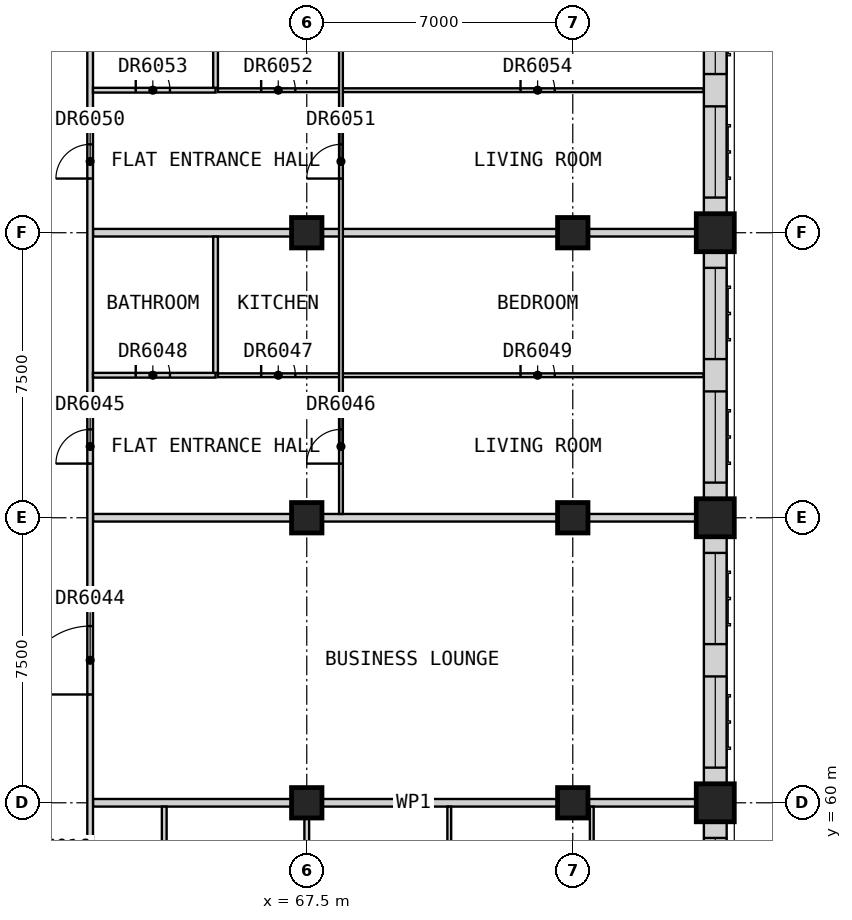
"""IFC4 building model, lengths in metres.
Left out: names, types, materials, properties, quantities, classifications, styles, units other than length and angle.
Written with IfcOpenShell. Run it as: python <this file> out.ifc"""

import sys

from ifc_helpers import new_model, si_unit, direction, frame, frame_2d, origin, origin_2d, place, context, subcontext, project, spatial, rectangle, extrude, element, fill, save


model = new_model("IFC4")
c1 = context("Model", 3, precision=1e-05, world=origin(), true_north=direction((0.0, 1.0)))
c2 = subcontext(c1, "Body", "Model", "MODEL_VIEW")
j1 = project(units=[si_unit("LENGTHUNIT", "METRE"), si_unit("PLANEANGLEUNIT", "RADIAN")], contexts=[c1])
p1 = place(None, origin())
s1 = spatial("IfcSite", under=j1, at=p1, CompositionType="ELEMENT")
p2 = place(p1, origin())
s2 = spatial("IfcBuilding", under=s1, at=p2, CompositionType="ELEMENT")
p3 = place(p2, frame((0.0, 0.0, 226.7)))
s3 = spatial("IfcBuildingStorey", under=s2, at=p3, CompositionType="ELEMENT", Elevation=226.7)
for number, where, z_axis, x_axis in (
    (1, (78.25, 60.0, 0.0), (0.0, 0.0, 1.0), (1.0, 0.0, 0.0)),
    (2, (78.25, 67.5, 0.0), (0.0, 0.0, 1.0), (1.0, 0.0, 0.0)),
    (3, (78.25, 75.0, 0.0), (0.0, 0.0, 1.0), (1.0, 0.0, 0.0)),
):
    element("IfcColumn", number, at=place(p3, frame(where, z_axis=z_axis, x_axis=x_axis)), inside=s3, PredefinedType="COLUMN", context=c2, shape_type="SweptSolid", body=[
        extrude(rectangle(XDim=1.0, YDim=1.0, at=origin_2d()), origin(), (0.0, 0.0, 1.0), 3.5),
    ])
for number, where, z_axis, x_axis in (
    (4, (67.5, 60.0, 0.0), (0.0, 0.0, 1.0), (1.0, 0.0, 0.0)),
    (5, (67.5, 67.5, 0.0), (0.0, 0.0, 1.0), (1.0, 0.0, 0.0)),
    (6, (67.5, 75.0, 0.0), (0.0, 0.0, 1.0), (1.0, 0.0, 0.0)),
    (7, (74.5, 60.0, 0.0), (0.0, 0.0, 1.0), (1.0, 0.0, 0.0)),
    (8, (74.5, 67.5, 0.0), (0.0, 0.0, 1.0), (1.0, 0.0, 0.0)),
    (9, (74.5, 75.0, 0.0), (0.0, 0.0, 1.0), (1.0, 0.0, 0.0)),
):
    element("IfcColumn", number, at=place(p3, frame(where, z_axis=z_axis, x_axis=x_axis)), inside=s3, PredefinedType="COLUMN", context=c2, shape_type="SweptSolid", body=[
        extrude(rectangle(XDim=0.8, YDim=0.8, at=origin_2d()), origin(), (0.0, 0.0, 1.0), 3.5),
    ])
p4 = place(p3, frame((78.25, 53.0, 0.0), z_axis=(0.0, 0.0, 1.0), x_axis=(0.0, 1.0, 0.0)))
e10 = element("IfcWall", 10, at=p4, inside=s3, PredefinedType="SOLIDWALL", context=c2, shape_type="SweptSolid", body=[
    extrude(rectangle(XDim=6.5, YDim=0.6, at=frame_2d((3.25, 0.0))), origin(), (0.0, 0.0, 1.0), 2.75),
])
p5 = place(p4, frame((0.425, 0.0, 0.8)))
e11 = element("IfcOpeningElement", 11, at=p5, cuts=e10, PredefinedType="OPENING", context=c2, shape_type="SweptSolid", body=[
    extrude(rectangle(XDim=2.4, YDim=1.8, at=frame_2d((1.2, 0.9))), frame((0.0, 0.31, 0.0), z_axis=(0.0, -1.0, 0.0), x_axis=(1.0, 0.0, 0.0)), (0.0, 0.0, 1.0), 0.62),
])
p6 = place(p4, frame((3.675, 0.0, 0.8)))
e12 = element("IfcOpeningElement", 12, at=p6, cuts=e10, PredefinedType="OPENING", context=c2, shape_type="SweptSolid", body=[
    extrude(rectangle(XDim=2.4, YDim=1.8, at=frame_2d((1.2, 0.9))), frame((0.0, 0.31, 0.0), z_axis=(0.0, -1.0, 0.0), x_axis=(1.0, 0.0, 0.0)), (0.0, 0.0, 1.0), 0.62),
])
p7 = place(p3, frame((78.25, 60.5, 0.0), z_axis=(0.0, 0.0, 1.0), x_axis=(0.0, 1.0, 0.0)))
e13 = element("IfcWall", 13, at=p7, inside=s3, PredefinedType="SOLIDWALL", context=c2, shape_type="SweptSolid", body=[
    extrude(rectangle(XDim=6.5, YDim=0.6, at=frame_2d((3.25, 0.0))), origin(), (0.0, 0.0, 1.0), 2.75),
])
p8 = place(p7, frame((0.425, 0.0, 0.8)))
e14 = element("IfcOpeningElement", 14, at=p8, cuts=e13, PredefinedType="OPENING", context=c2, shape_type="SweptSolid", body=[
    extrude(rectangle(XDim=2.4, YDim=1.8, at=frame_2d((1.2, 0.9))), frame((0.0, 0.31, 0.0), z_axis=(0.0, -1.0, 0.0), x_axis=(1.0, 0.0, 0.0)), (0.0, 0.0, 1.0), 0.62),
])
p9 = place(p7, frame((3.675, 0.0, 0.8)))
e15 = element("IfcOpeningElement", 15, at=p9, cuts=e13, PredefinedType="OPENING", context=c2, shape_type="SweptSolid", body=[
    extrude(rectangle(XDim=2.4, YDim=1.8, at=frame_2d((1.2, 0.9))), frame((0.0, 0.31, 0.0), z_axis=(0.0, -1.0, 0.0), x_axis=(1.0, 0.0, 0.0)), (0.0, 0.0, 1.0), 0.62),
])
p10 = place(p3, frame((78.25, 68.0, 0.0), z_axis=(0.0, 0.0, 1.0), x_axis=(0.0, 1.0, 0.0)))
e16 = element("IfcWall", 16, at=p10, inside=s3, PredefinedType="SOLIDWALL", context=c2, shape_type="SweptSolid", body=[
    extrude(rectangle(XDim=6.5, YDim=0.6, at=frame_2d((3.25, 0.0))), origin(), (0.0, 0.0, 1.0), 2.75),
])
p11 = place(p10, frame((0.425, 0.0, 0.8)))
e17 = element("IfcOpeningElement", 17, at=p11, cuts=e16, PredefinedType="OPENING", context=c2, shape_type="SweptSolid", body=[
    extrude(rectangle(XDim=2.4, YDim=1.8, at=frame_2d((1.2, 0.9))), frame((0.0, 0.31, 0.0), z_axis=(0.0, -1.0, 0.0), x_axis=(1.0, 0.0, 0.0)), (0.0, 0.0, 1.0), 0.62),
])
p12 = place(p10, frame((3.675, 0.0, 0.8)))
e18 = element("IfcOpeningElement", 18, at=p12, cuts=e16, PredefinedType="OPENING", context=c2, shape_type="SweptSolid", body=[
    extrude(rectangle(XDim=2.4, YDim=1.8, at=frame_2d((1.2, 0.9))), frame((0.0, 0.31, 0.0), z_axis=(0.0, -1.0, 0.0), x_axis=(1.0, 0.0, 0.0)), (0.0, 0.0, 1.0), 0.62),
])
p13 = place(p3, frame((78.25, 75.5, 0.0), z_axis=(0.0, 0.0, 1.0), x_axis=(0.0, 1.0, 0.0)))
e19 = element("IfcWall", 19, at=p13, inside=s3, PredefinedType="SOLIDWALL", context=c2, shape_type="SweptSolid", body=[
    extrude(rectangle(XDim=6.5, YDim=0.6, at=frame_2d((3.25, 0.0))), origin(), (0.0, 0.0, 1.0), 2.75),
])
p14 = place(p13, frame((0.425, 0.0, 0.8)))
e20 = element("IfcOpeningElement", 20, at=p14, cuts=e19, PredefinedType="OPENING", context=c2, shape_type="SweptSolid", body=[
    extrude(rectangle(XDim=2.4, YDim=1.8, at=frame_2d((1.2, 0.9))), frame((0.0, 0.31, 0.0), z_axis=(0.0, -1.0, 0.0), x_axis=(1.0, 0.0, 0.0)), (0.0, 0.0, 1.0), 0.62),
])
p15 = place(p13, frame((3.675, 0.0, 0.8)))
e21 = element("IfcOpeningElement", 21, at=p15, cuts=e19, PredefinedType="OPENING", context=c2, shape_type="SweptSolid", body=[
    extrude(rectangle(XDim=2.4, YDim=1.8, at=frame_2d((1.2, 0.9))), frame((0.0, 0.31, 0.0), z_axis=(0.0, -1.0, 0.0), x_axis=(1.0, 0.0, 0.0)), (0.0, 0.0, 1.0), 0.62),
])
for number, where, z_axis, x_axis in (
    (22, (61.875, 60.0, 0.0), (0.0, 0.0, 1.0), (1.0, 0.0, 0.0)),
    (23, (61.875, 67.5, 0.0), (0.0, 0.0, 1.0), (1.0, 0.0, 0.0)),
    (24, (61.875, 75.0, 0.0), (0.0, 0.0, 1.0), (1.0, 0.0, 0.0)),
):
    element("IfcWall", number, at=place(p3, frame(where, z_axis=z_axis, x_axis=x_axis)), inside=s3, PredefinedType="PARTITIONING", context=c2, shape_type="SweptSolid", body=[
        extrude(rectangle(XDim=16.875, YDim=0.2, at=frame_2d((8.438, 0.0))), origin(), (0.0, 0.0, 1.0), 3.25),
    ])
p16 = place(p3, frame((61.8, 58.275, 0.0), z_axis=(0.0, 0.0, 1.0), x_axis=(0.0, 1.0, 0.0)))
e25 = element("IfcWall", 25, at=p16, inside=s3, PredefinedType="PARTITIONING", context=c2, shape_type="SweptSolid", body=[
    extrude(rectangle(XDim=25.95, YDim=0.15, at=frame_2d((12.975, 0.0))), origin(), (0.0, 0.0, 1.0), 3.25),
])
p17 = place(p16, frame((4.575, 0.0, 0.0)))
e26 = element("IfcOpeningElement", 26, at=p17, cuts=e25, PredefinedType="OPENING", context=c2, shape_type="SweptSolid", body=[
    extrude(rectangle(XDim=1.8, YDim=2.1, at=frame_2d((0.9, 1.05))), frame((0.0, 0.085, 0.0), z_axis=(0.0, -1.0, 0.0), x_axis=(1.0, 0.0, 0.0)), (0.0, 0.0, 1.0), 0.17),
])
p18 = place(p16, frame((10.65, 0.0, 0.0)))
e27 = element("IfcOpeningElement", 27, at=p18, cuts=e25, PredefinedType="OPENING", context=c2, shape_type="SweptSolid", body=[
    extrude(rectangle(XDim=0.9, YDim=2.1, at=frame_2d((0.45, 1.05))), frame((0.0, 0.085, 0.0), z_axis=(0.0, -1.0, 0.0), x_axis=(1.0, 0.0, 0.0)), (0.0, 0.0, 1.0), 0.17),
])
p19 = place(p16, frame((18.15, 0.0, 0.0)))
e28 = element("IfcOpeningElement", 28, at=p19, cuts=e25, PredefinedType="OPENING", context=c2, shape_type="SweptSolid", body=[
    extrude(rectangle(XDim=0.9, YDim=2.1, at=frame_2d((0.45, 1.05))), frame((0.0, 0.085, 0.0), z_axis=(0.0, -1.0, 0.0), x_axis=(1.0, 0.0, 0.0)), (0.0, 0.0, 1.0), 0.17),
])
p20 = place(p3, frame((65.163, 71.25, 0.0), z_axis=(0.0, 0.0, 1.0), x_axis=(1.0, 0.0, 0.0)))
e29 = element("IfcWall", 29, at=p20, inside=s3, PredefinedType="PARTITIONING", context=c2, shape_type="SweptSolid", body=[
    extrude(rectangle(XDim=12.777, YDim=0.1, at=frame_2d((6.389, 0.0))), origin(), (0.0, 0.0, 1.0), 3.25),
])
p21 = place(p20, frame((1.137, 0.0, 0.0)))
e30 = element("IfcOpeningElement", 30, at=p21, cuts=e29, PredefinedType="OPENING", context=c2, shape_type="SweptSolid", body=[
    extrude(rectangle(XDim=0.9, YDim=2.1, at=frame_2d((0.45, 1.05))), frame((0.0, 0.06, 0.0), z_axis=(0.0, -1.0, 0.0), x_axis=(1.0, 0.0, 0.0)), (0.0, 0.0, 1.0), 0.12),
])
p22 = place(p20, frame((7.962, 0.0, 0.0)))
e31 = element("IfcOpeningElement", 31, at=p22, cuts=e29, PredefinedType="OPENING", context=c2, shape_type="SweptSolid", body=[
    extrude(rectangle(XDim=0.9, YDim=2.1, at=frame_2d((0.45, 1.05))), frame((0.0, 0.06, 0.0), z_axis=(0.0, -1.0, 0.0), x_axis=(1.0, 0.0, 0.0)), (0.0, 0.0, 1.0), 0.12),
])
p23 = place(p3, frame((65.163, 78.75, 0.0), z_axis=(0.0, 0.0, 1.0), x_axis=(1.0, 0.0, 0.0)))
e32 = element("IfcWall", 32, at=p23, inside=s3, PredefinedType="PARTITIONING", context=c2, shape_type="SweptSolid", body=[
    extrude(rectangle(XDim=12.777, YDim=0.1, at=frame_2d((6.389, 0.0))), origin(), (0.0, 0.0, 1.0), 3.25),
])
p24 = place(p23, frame((1.137, 0.0, 0.0)))
e33 = element("IfcOpeningElement", 33, at=p24, cuts=e32, PredefinedType="OPENING", context=c2, shape_type="SweptSolid", body=[
    extrude(rectangle(XDim=0.9, YDim=2.1, at=frame_2d((0.45, 1.05))), frame((0.0, 0.06, 0.0), z_axis=(0.0, -1.0, 0.0), x_axis=(1.0, 0.0, 0.0)), (0.0, 0.0, 1.0), 0.12),
])
p25 = place(p23, frame((7.962, 0.0, 0.0)))
e34 = element("IfcOpeningElement", 34, at=p25, cuts=e32, PredefinedType="OPENING", context=c2, shape_type="SweptSolid", body=[
    extrude(rectangle(XDim=0.9, YDim=2.1, at=frame_2d((0.45, 1.05))), frame((0.0, 0.06, 0.0), z_axis=(0.0, -1.0, 0.0), x_axis=(1.0, 0.0, 0.0)), (0.0, 0.0, 1.0), 0.12),
])
p26 = place(p3, frame((68.4, 67.6, 0.0), z_axis=(0.0, 0.0, 1.0), x_axis=(0.0, 1.0, 0.0)))
e35 = element("IfcWall", 35, at=p26, inside=s3, PredefinedType="PARTITIONING", context=c2, shape_type="SweptSolid", body=[
    extrude(rectangle(XDim=14.8, YDim=0.1, at=frame_2d((7.4, 0.0))), origin(), (0.0, 0.0, 1.0), 3.25),
])
p27 = place(p26, frame((1.325, 0.0, 0.0)))
e36 = element("IfcOpeningElement", 36, at=p27, cuts=e35, PredefinedType="OPENING", context=c2, shape_type="SweptSolid", body=[
    extrude(rectangle(XDim=0.9, YDim=2.1, at=frame_2d((0.45, 1.05))), frame((0.0, 0.06, 0.0), z_axis=(0.0, -1.0, 0.0), x_axis=(1.0, 0.0, 0.0)), (0.0, 0.0, 1.0), 0.12),
])
p28 = place(p26, frame((8.825, 0.0, 0.0)))
e37 = element("IfcOpeningElement", 37, at=p28, cuts=e35, PredefinedType="OPENING", context=c2, shape_type="SweptSolid", body=[
    extrude(rectangle(XDim=0.9, YDim=2.1, at=frame_2d((0.45, 1.05))), frame((0.0, 0.06, 0.0), z_axis=(0.0, -1.0, 0.0), x_axis=(1.0, 0.0, 0.0)), (0.0, 0.0, 1.0), 0.12),
])
p29 = place(p3, frame((71.25, 49.0, 0.0), z_axis=(0.0, 0.0, 1.0), x_axis=(0.0, 1.0, 0.0)))
e38 = element("IfcWall", 38, at=p29, inside=s3, PredefinedType="PARTITIONING", context=c2, shape_type="SweptSolid", body=[
    extrude(rectangle(XDim=10.9, YDim=0.1, at=frame_2d((5.45, 0.0))), origin(), (0.0, 0.0, 1.0), 3.25),
])
p30 = place(p3, frame((75.0, 47.06, 0.0), z_axis=(0.0, 0.0, 1.0), x_axis=(0.0, 1.0, 0.0)))
e39 = element("IfcWall", 39, at=p30, inside=s3, PredefinedType="PARTITIONING", context=c2, shape_type="SweptSolid", body=[
    extrude(rectangle(XDim=12.84, YDim=0.1, at=frame_2d((6.42, 0.0))), origin(), (0.0, 0.0, 1.0), 3.25),
])
p31 = place(p30, frame((0.24, 0.0, 0.0)))
e40 = element("IfcOpeningElement", 40, at=p31, cuts=e39, PredefinedType="OPENING", context=c2, shape_type="SweptSolid", body=[
    extrude(rectangle(XDim=0.9, YDim=2.1, at=frame_2d((0.45, 1.05))), frame((0.0, 0.06, 0.0), z_axis=(0.0, -1.0, 0.0), x_axis=(1.0, 0.0, 0.0)), (0.0, 0.0, 1.0), 0.12),
])
p32 = place(p3, frame((61.875, 71.25, 0.0), z_axis=(0.0, 0.0, 1.0), x_axis=(1.0, 0.0, 0.0)))
e41 = element("IfcWall", 41, at=p32, inside=s3, PredefinedType="PARTITIONING", context=c2, shape_type="SweptSolid", body=[
    extrude(rectangle(XDim=3.225, YDim=0.125, at=frame_2d((1.613, 0.0))), origin(), (0.0, 0.0, 1.0), 3.25),
])
p33 = place(p32, frame((1.125, 0.0, 0.0)))
e42 = element("IfcOpeningElement", 42, at=p33, cuts=e41, PredefinedType="OPENING", context=c2, shape_type="SweptSolid", body=[
    extrude(rectangle(XDim=0.9, YDim=2.1, at=frame_2d((0.45, 1.05))), frame((0.0, 0.073, 0.0), z_axis=(0.0, -1.0, 0.0), x_axis=(1.0, 0.0, 0.0)), (0.0, 0.0, 1.0), 0.145),
])
p34 = place(p3, frame((61.875, 78.75, 0.0), z_axis=(0.0, 0.0, 1.0), x_axis=(1.0, 0.0, 0.0)))
e43 = element("IfcWall", 43, at=p34, inside=s3, PredefinedType="PARTITIONING", context=c2, shape_type="SweptSolid", body=[
    extrude(rectangle(XDim=3.225, YDim=0.125, at=frame_2d((1.613, 0.0))), origin(), (0.0, 0.0, 1.0), 3.25),
])
p35 = place(p34, frame((1.125, 0.0, 0.0)))
e44 = element("IfcOpeningElement", 44, at=p35, cuts=e43, PredefinedType="OPENING", context=c2, shape_type="SweptSolid", body=[
    extrude(rectangle(XDim=0.9, YDim=2.1, at=frame_2d((0.45, 1.05))), frame((0.0, 0.073, 0.0), z_axis=(0.0, -1.0, 0.0), x_axis=(1.0, 0.0, 0.0)), (0.0, 0.0, 1.0), 0.145),
])
p36 = place(p3, frame((63.75, 54.538, 0.0), z_axis=(0.0, 0.0, 1.0), x_axis=(0.0, 1.0, 0.0)))
e45 = element("IfcWall", 45, at=p36, inside=s3, PredefinedType="PARTITIONING", context=c2, shape_type="SweptSolid", body=[
    extrude(rectangle(XDim=5.362, YDim=0.125, at=frame_2d((2.681, 0.0))), origin(), (0.0, 0.0, 1.0), 3.25),
])
p37 = place(p36, frame((2.25, 0.0, 0.0)))
e46 = element("IfcOpeningElement", 46, at=p37, cuts=e45, PredefinedType="OPENING", context=c2, shape_type="SweptSolid", body=[
    extrude(rectangle(XDim=0.9, YDim=2.1, at=frame_2d((0.45, 1.05))), frame((0.0, 0.073, 0.0), z_axis=(0.0, -1.0, 0.0), x_axis=(1.0, 0.0, 0.0)), (0.0, 0.0, 1.0), 0.145),
])
for number, where, z_axis, x_axis in (
    (47, (65.1, 71.312, 0.0), (0.0, 0.0, 1.0), (0.0, 1.0, 0.0)),
    (48, (65.1, 78.812, 0.0), (0.0, 0.0, 1.0), (0.0, 1.0, 0.0)),
):
    element("IfcWall", number, at=place(p3, frame(where, z_axis=z_axis, x_axis=x_axis)), inside=s3, PredefinedType="PARTITIONING", context=c2, shape_type="SweptSolid", body=[
        extrude(rectangle(XDim=3.587, YDim=0.125, at=frame_2d((1.794, 0.0))), origin(), (0.0, 0.0, 1.0), 3.25),
    ])
p38 = place(p3, frame((67.5, 54.538, 0.0), z_axis=(0.0, 0.0, 1.0), x_axis=(0.0, 1.0, 0.0)))
e49 = element("IfcWall", 49, at=p38, inside=s3, PredefinedType="PARTITIONING", context=c2, shape_type="SweptSolid", body=[
    extrude(rectangle(XDim=5.362, YDim=0.125, at=frame_2d((2.681, 0.0))), origin(), (0.0, 0.0, 1.0), 3.25),
])
p39 = place(p6, origin())
e50 = element("IfcWindow", 50, at=p39, inside=s3, PartitioningType="SINGLE_PANEL", PredefinedType="WINDOW", context=c2, shape_type="SweptSolid", body=[
    extrude(rectangle(XDim=2.4, YDim=1.8, at=frame_2d((1.2, 0.9))), frame((0.0, -0.07, 0.0), z_axis=(0.0, -1.0, 0.0), x_axis=(1.0, 0.0, 0.0)), (0.0, 0.0, 1.0), 0.06),
])
fill(e12, e50)
p40 = place(p8, origin())
e51 = element("IfcWindow", 51, at=p40, inside=s3, PartitioningType="SINGLE_PANEL", PredefinedType="WINDOW", context=c2, shape_type="SweptSolid", body=[
    extrude(rectangle(XDim=2.4, YDim=1.8, at=frame_2d((1.2, 0.9))), frame((0.0, -0.07, 0.0), z_axis=(0.0, -1.0, 0.0), x_axis=(1.0, 0.0, 0.0)), (0.0, 0.0, 1.0), 0.06),
])
fill(e14, e51)
p41 = place(p9, origin())
e52 = element("IfcWindow", 52, at=p41, inside=s3, PartitioningType="SINGLE_PANEL", PredefinedType="WINDOW", context=c2, shape_type="SweptSolid", body=[
    extrude(rectangle(XDim=2.4, YDim=1.8, at=frame_2d((1.2, 0.9))), frame((0.0, -0.07, 0.0), z_axis=(0.0, -1.0, 0.0), x_axis=(1.0, 0.0, 0.0)), (0.0, 0.0, 1.0), 0.06),
])
fill(e15, e52)
p42 = place(p11, origin())
e53 = element("IfcWindow", 53, at=p42, inside=s3, PartitioningType="SINGLE_PANEL", PredefinedType="WINDOW", context=c2, shape_type="SweptSolid", body=[
    extrude(rectangle(XDim=2.4, YDim=1.8, at=frame_2d((1.2, 0.9))), frame((0.0, -0.07, 0.0), z_axis=(0.0, -1.0, 0.0), x_axis=(1.0, 0.0, 0.0)), (0.0, 0.0, 1.0), 0.06),
])
fill(e17, e53)
p43 = place(p12, origin())
e54 = element("IfcWindow", 54, at=p43, inside=s3, PartitioningType="SINGLE_PANEL", PredefinedType="WINDOW", context=c2, shape_type="SweptSolid", body=[
    extrude(rectangle(XDim=2.4, YDim=1.8, at=frame_2d((1.2, 0.9))), frame((0.0, -0.07, 0.0), z_axis=(0.0, -1.0, 0.0), x_axis=(1.0, 0.0, 0.0)), (0.0, 0.0, 1.0), 0.06),
])
fill(e18, e54)
p44 = place(p14, origin())
e55 = element("IfcWindow", 55, at=p44, inside=s3, PartitioningType="SINGLE_PANEL", PredefinedType="WINDOW", context=c2, shape_type="SweptSolid", body=[
    extrude(rectangle(XDim=2.4, YDim=1.8, at=frame_2d((1.2, 0.9))), frame((0.0, -0.07, 0.0), z_axis=(0.0, -1.0, 0.0), x_axis=(1.0, 0.0, 0.0)), (0.0, 0.0, 1.0), 0.06),
])
fill(e20, e55)
p45 = place(p15, origin())
e56 = element("IfcWindow", 56, at=p45, inside=s3, PartitioningType="SINGLE_PANEL", PredefinedType="WINDOW", context=c2, shape_type="SweptSolid", body=[
    extrude(rectangle(XDim=2.4, YDim=1.8, at=frame_2d((1.2, 0.9))), frame((0.0, -0.07, 0.0), z_axis=(0.0, -1.0, 0.0), x_axis=(1.0, 0.0, 0.0)), (0.0, 0.0, 1.0), 0.06),
])
fill(e21, e56)
p46 = place(p17, origin())
e57 = element("IfcDoor", 57, at=p46, inside=s3, OperationType="DOUBLE_DOOR_SINGLE_SWING", PredefinedType="DOOR", context=c2, shape_type="SweptSolid", body=[
    extrude(rectangle(XDim=1.8, YDim=2.1, at=frame_2d((0.9, 1.05))), frame((0.0, 0.025, 0.0), z_axis=(0.0, -1.0, 0.0), x_axis=(1.0, 0.0, 0.0)), (0.0, 0.0, 1.0), 0.05),
])
fill(e26, e57)
p47 = place(p18, origin())
e58 = element("IfcDoor", 58, at=p47, inside=s3, OperationType="SINGLE_SWING_RIGHT", PredefinedType="DOOR", context=c2, shape_type="SweptSolid", body=[
    extrude(rectangle(XDim=0.9, YDim=2.1, at=frame_2d((0.45, 1.05))), frame((0.0, 0.025, 0.0), z_axis=(0.0, -1.0, 0.0), x_axis=(1.0, 0.0, 0.0)), (0.0, 0.0, 1.0), 0.05),
])
fill(e27, e58)
p48 = place(p27, origin())
e59 = element("IfcDoor", 59, at=p48, inside=s3, OperationType="SINGLE_SWING_LEFT", PredefinedType="DOOR", context=c2, shape_type="SweptSolid", body=[
    extrude(rectangle(XDim=0.9, YDim=2.1, at=frame_2d((0.45, 1.05))), frame((0.0, 0.025, 0.0), z_axis=(0.0, -1.0, 0.0), x_axis=(1.0, 0.0, 0.0)), (0.0, 0.0, 1.0), 0.05),
])
fill(e36, e59)
p49 = place(p21, origin())
e60 = element("IfcDoor", 60, at=p49, inside=s3, OperationType="SINGLE_SWING_LEFT", PredefinedType="DOOR", context=c2, shape_type="SweptSolid", body=[
    extrude(rectangle(XDim=0.9, YDim=2.1, at=frame_2d((0.45, 1.05))), frame((0.0, 0.025, 0.0), z_axis=(0.0, -1.0, 0.0), x_axis=(1.0, 0.0, 0.0)), (0.0, 0.0, 1.0), 0.05),
])
fill(e30, e60)
p50 = place(p33, origin())
e61 = element("IfcDoor", 61, at=p50, inside=s3, OperationType="SINGLE_SWING_RIGHT", PredefinedType="DOOR", context=c2, shape_type="SweptSolid", body=[
    extrude(rectangle(XDim=0.9, YDim=2.1, at=frame_2d((0.45, 1.05))), frame((0.0, 0.025, 0.0), z_axis=(0.0, -1.0, 0.0), x_axis=(1.0, 0.0, 0.0)), (0.0, 0.0, 1.0), 0.05),
])
fill(e42, e61)
p51 = place(p22, origin())
e62 = element("IfcDoor", 62, at=p51, inside=s3, OperationType="SINGLE_SWING_LEFT", PredefinedType="DOOR", context=c2, shape_type="SweptSolid", body=[
    extrude(rectangle(XDim=0.9, YDim=2.1, at=frame_2d((0.45, 1.05))), frame((0.0, 0.025, 0.0), z_axis=(0.0, -1.0, 0.0), x_axis=(1.0, 0.0, 0.0)), (0.0, 0.0, 1.0), 0.05),
])
fill(e31, e62)
p52 = place(p19, origin())
e63 = element("IfcDoor", 63, at=p52, inside=s3, OperationType="SINGLE_SWING_RIGHT", PredefinedType="DOOR", context=c2, shape_type="SweptSolid", body=[
    extrude(rectangle(XDim=0.9, YDim=2.1, at=frame_2d((0.45, 1.05))), frame((0.0, 0.025, 0.0), z_axis=(0.0, -1.0, 0.0), x_axis=(1.0, 0.0, 0.0)), (0.0, 0.0, 1.0), 0.05),
])
fill(e28, e63)
p53 = place(p28, origin())
e64 = element("IfcDoor", 64, at=p53, inside=s3, OperationType="SINGLE_SWING_LEFT", PredefinedType="DOOR", context=c2, shape_type="SweptSolid", body=[
    extrude(rectangle(XDim=0.9, YDim=2.1, at=frame_2d((0.45, 1.05))), frame((0.0, 0.025, 0.0), z_axis=(0.0, -1.0, 0.0), x_axis=(1.0, 0.0, 0.0)), (0.0, 0.0, 1.0), 0.05),
])
fill(e37, e64)
p54 = place(p24, origin())
e65 = element("IfcDoor", 65, at=p54, inside=s3, OperationType="SINGLE_SWING_LEFT", PredefinedType="DOOR", context=c2, shape_type="SweptSolid", body=[
    extrude(rectangle(XDim=0.9, YDim=2.1, at=frame_2d((0.45, 1.05))), frame((0.0, 0.025, 0.0), z_axis=(0.0, -1.0, 0.0), x_axis=(1.0, 0.0, 0.0)), (0.0, 0.0, 1.0), 0.05),
])
fill(e33, e65)
p55 = place(p35, origin())
e66 = element("IfcDoor", 66, at=p55, inside=s3, OperationType="SINGLE_SWING_RIGHT", PredefinedType="DOOR", context=c2, shape_type="SweptSolid", body=[
    extrude(rectangle(XDim=0.9, YDim=2.1, at=frame_2d((0.45, 1.05))), frame((0.0, 0.025, 0.0), z_axis=(0.0, -1.0, 0.0), x_axis=(1.0, 0.0, 0.0)), (0.0, 0.0, 1.0), 0.05),
])
fill(e44, e66)
p56 = place(p25, origin())
e67 = element("IfcDoor", 67, at=p56, inside=s3, OperationType="SINGLE_SWING_LEFT", PredefinedType="DOOR", context=c2, shape_type="SweptSolid", body=[
    extrude(rectangle(XDim=0.9, YDim=2.1, at=frame_2d((0.45, 1.05))), frame((0.0, 0.025, 0.0), z_axis=(0.0, -1.0, 0.0), x_axis=(1.0, 0.0, 0.0)), (0.0, 0.0, 1.0), 0.05),
])
fill(e34, e67)
save(model, sys.argv[1])
